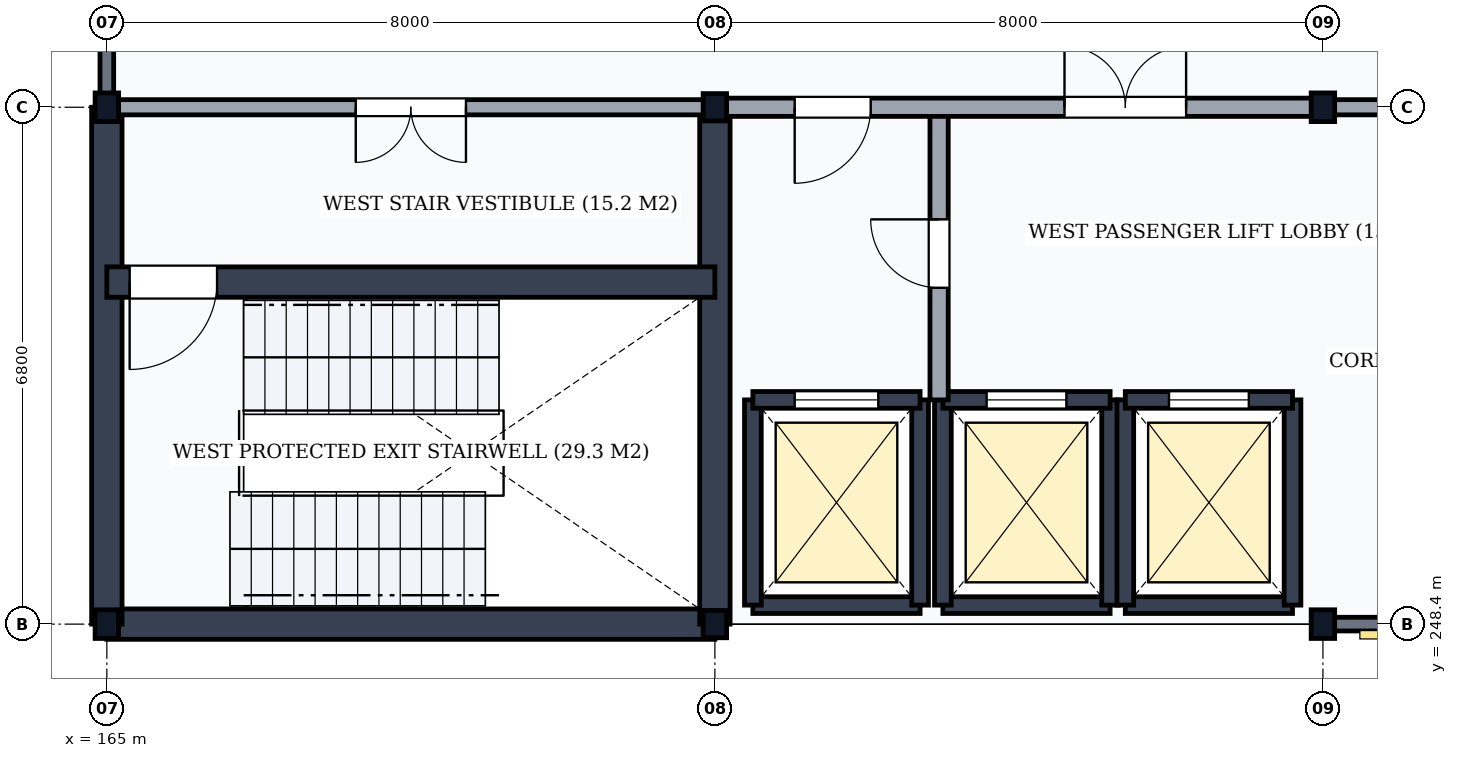
"""IFC4 building model, lengths in metres.
Left out: names, types, materials, properties, quantities, classifications, styles, units other than length and angle.
Written with IfcOpenShell. Run it as: python <this file> out.ifc"""

import sys

from ifc_helpers import new_model, si_unit, direction, frame, frame_2d, origin, origin_2d, place, context, subcontext, project, spatial, rectangle, i_section, extrude, element, fill, save


model = new_model("IFC4")
c1 = context("Model", 3, precision=1e-05, world=origin(), true_north=direction((0.0, 1.0)))
c2 = subcontext(c1, "Body", "Model", "MODEL_VIEW")
j1 = project(units=[si_unit("LENGTHUNIT", "METRE"), si_unit("PLANEANGLEUNIT", "RADIAN")], contexts=[c1])
p1 = place(None, origin())
s1 = spatial("IfcSite", under=j1, at=p1, CompositionType="ELEMENT")
p2 = place(p1, origin())
s2 = spatial("IfcBuilding", under=s1, at=p2, CompositionType="ELEMENT")
p3 = place(p2, frame((0.0, 0.0, 51.6)))
s3 = spatial("IfcBuildingStorey", under=s2, at=p3, CompositionType="ELEMENT", Elevation=51.6)
for number, where, z_axis, x_axis in (
    (1, (165.0, 248.4, 0.0), (0.0, 0.0, 1.0), (1.0, 0.0, 0.0)),
    (2, (165.0, 255.2, 0.0), (0.0, 0.0, 1.0), (1.0, 0.0, 0.0)),
):
    element("IfcColumn", number, at=place(p3, frame(where, z_axis=z_axis, x_axis=x_axis)), inside=s3, PredefinedType="COLUMN", context=c2, shape_type="SweptSolid", body=[
        extrude(i_section(OverallWidth=0.309, OverallDepth=0.377, WebThickness=0.021, FlangeThickness=0.04, FilletRadius=0.027, at=origin_2d()), origin(), (0.0, 0.0, 1.0), 4.5),
    ])
for number, where, z_axis, x_axis in (
    (3, (173.0, 248.4, 0.0), (0.0, 0.0, 1.0), (1.0, 0.0, 0.0)),
    (4, (173.0, 255.2, 0.0), (0.0, 0.0, 1.0), (1.0, 0.0, 0.0)),
):
    element("IfcColumn", number, at=place(p3, frame(where, z_axis=z_axis, x_axis=x_axis)), inside=s3, PredefinedType="COLUMN", context=c2, shape_type="SweptSolid", body=[
        extrude(i_section(OverallWidth=0.309, OverallDepth=0.359, WebThickness=0.021, FlangeThickness=0.04, FilletRadius=0.027, at=origin_2d()), origin(), (0.0, 0.0, 1.0), 4.5),
    ])
for number, where, z_axis, x_axis in (
    (5, (181.0, 248.4, 0.0), (0.0, 0.0, 1.0), (1.0, 0.0, 0.0)),
    (6, (181.0, 255.2, 0.0), (0.0, 0.0, 1.0), (1.0, 0.0, 0.0)),
):
    element("IfcColumn", number, at=place(p3, frame(where, z_axis=z_axis, x_axis=x_axis)), inside=s3, PredefinedType="COLUMN", context=c2, shape_type="SweptSolid", body=[
        extrude(i_section(OverallWidth=0.309, OverallDepth=0.377, WebThickness=0.021, FlangeThickness=0.04, FilletRadius=0.027, at=origin_2d()), origin(), (0.0, 0.0, 1.0), 4.5),
    ])
p4 = place(p3, frame((181.006, 248.4, 0.0), z_axis=(0.0, 0.0, 1.0), x_axis=(1.0, 0.0, 0.0)))
e7 = element("IfcWall", 7, at=p4, inside=s3, PredefinedType="SOLIDWALL", context=c2, shape_type="SweptSolid", body=[
    extrude(rectangle(XDim=7.988, YDim=0.18, at=frame_2d((3.994, 0.0))), origin(), (0.0, 0.0, 1.0), 3.868),
])
p5 = place(p4, frame((2.944, 0.0, 0.95)))
e8 = element("IfcOpeningElement", 8, at=p5, cuts=e7, PredefinedType="OPENING", context=c2, shape_type="SweptSolid", body=[
    extrude(rectangle(XDim=1.5, YDim=1.9, at=frame_2d((0.75, 0.95))), frame((0.0, 0.105, 0.0), z_axis=(0.0, -1.0, 0.0), x_axis=(1.0, 0.0, 0.0)), (0.0, 0.0, 1.0), 0.21),
])
p6 = place(p3, frame((165.0, 255.206, 0.0), z_axis=(0.0, 0.0, 1.0), x_axis=(0.0, 1.0, 0.0)))
e9 = element("IfcWall", 9, at=p6, inside=s3, PredefinedType="SOLIDWALL", context=c2, shape_type="SweptSolid", body=[
    extrude(rectangle(XDim=7.588, YDim=0.18, at=frame_2d((3.794, 0.0))), origin(), (0.0, 0.0, 1.0), 3.908),
])
p7 = place(p3, frame((165.0, 248.4, 0.0), z_axis=(0.0, 0.0, 1.0), x_axis=(1.0, 0.0, 0.0)))
e10 = element("IfcWall", 10, at=p7, inside=s3, PredefinedType="SHEAR", context=c2, shape_type="SweptSolid", body=[
    extrude(rectangle(XDim=8.0, YDim=0.4, at=frame_2d((4.0, 0.0))), origin(), (0.0, 0.0, 1.0), 4.18),
])
for number, where, z_axis, x_axis in (
    (11, (165.0, 248.4, 0.0), (0.0, 0.0, 1.0), (0.0, 1.0, 0.0)),
    (12, (173.0, 248.4, 0.0), (0.0, 0.0, 1.0), (0.0, 1.0, 0.0)),
):
    element("IfcWall", number, at=place(p3, frame(where, z_axis=z_axis, x_axis=x_axis)), inside=s3, PredefinedType="SHEAR", context=c2, shape_type="SweptSolid", body=[
        extrude(rectangle(XDim=6.8, YDim=0.4, at=frame_2d((3.4, 0.0))), origin(), (0.0, 0.0, 1.0), 4.18),
    ])
p8 = place(p3, frame((165.0, 252.9, 0.0), z_axis=(0.0, 0.0, 1.0), x_axis=(1.0, 0.0, 0.0)))
e13 = element("IfcWall", 13, at=p8, inside=s3, PredefinedType="SHEAR", context=c2, shape_type="SweptSolid", body=[
    extrude(rectangle(XDim=8.0, YDim=0.4, at=frame_2d((4.0, 0.0))), origin(), (0.0, 0.0, 1.0), 4.18),
])
p9 = place(p8, frame((0.3, 0.0, 0.0)))
e14 = element("IfcOpeningElement", 14, at=p9, cuts=e13, PredefinedType="OPENING", context=c2, shape_type="SweptSolid", body=[
    extrude(rectangle(XDim=1.15, YDim=2.15, at=frame_2d((0.575, 1.075))), frame((0.0, 0.215, 0.0), z_axis=(0.0, -1.0, 0.0), x_axis=(1.0, 0.0, 0.0)), (0.0, 0.0, 1.0), 0.43),
])
p10 = place(p3, frame((165.0, 255.2, 0.0), z_axis=(0.0, 0.0, 1.0), x_axis=(1.0, 0.0, 0.0)))
e15 = element("IfcWall", 15, at=p10, inside=s3, PredefinedType="PARTITIONING", context=c2, shape_type="SweptSolid", body=[
    extrude(rectangle(XDim=8.0, YDim=0.2, at=frame_2d((4.0, 0.0))), origin(), (0.0, 0.0, 1.0), 3.678),
])
p11 = place(p10, frame((3.275, 0.0, 0.0)))
e16 = element("IfcOpeningElement", 16, at=p11, cuts=e15, PredefinedType="OPENING", context=c2, shape_type="SweptSolid", body=[
    extrude(rectangle(XDim=1.45, YDim=2.2, at=frame_2d((0.725, 1.1))), frame((0.0, 0.115, 0.0), z_axis=(0.0, -1.0, 0.0), x_axis=(1.0, 0.0, 0.0)), (0.0, 0.0, 1.0), 0.23),
])
p12 = place(p3, frame((173.5, 248.65, 0.0), z_axis=(0.0, 0.0, 1.0), x_axis=(1.0, 0.0, 0.0)))
e17 = element("IfcWall", 17, at=p12, inside=s3, PredefinedType="SHEAR", context=c2, shape_type="SweptSolid", body=[
    extrude(rectangle(XDim=2.2, YDim=0.22, at=frame_2d((1.1, 0.0))), origin(), (0.0, 0.0, 1.0), 4.18),
])
for number, where, z_axis, x_axis in (
    (18, (173.5, 248.65, 0.0), (0.0, 0.0, 1.0), (0.0, 1.0, 0.0)),
    (19, (175.7, 248.65, 0.0), (0.0, 0.0, 1.0), (0.0, 1.0, 0.0)),
):
    element("IfcWall", number, at=place(p3, frame(where, z_axis=z_axis, x_axis=x_axis)), inside=s3, PredefinedType="SHEAR", context=c2, shape_type="SweptSolid", body=[
        extrude(rectangle(XDim=2.7, YDim=0.22, at=frame_2d((1.35, 0.0))), origin(), (0.0, 0.0, 1.0), 4.18),
    ])
p13 = place(p3, frame((173.5, 251.35, 0.0), z_axis=(0.0, 0.0, 1.0), x_axis=(1.0, 0.0, 0.0)))
e20 = element("IfcWall", 20, at=p13, inside=s3, PredefinedType="SHEAR", context=c2, shape_type="SweptSolid", body=[
    extrude(rectangle(XDim=2.2, YDim=0.22, at=frame_2d((1.1, 0.0))), origin(), (0.0, 0.0, 1.0), 4.18),
])
p14 = place(p13, frame((0.55, 0.0, 0.0)))
e21 = element("IfcOpeningElement", 21, at=p14, cuts=e20, PredefinedType="OPENING", context=c2, shape_type="SweptSolid", body=[
    extrude(rectangle(XDim=1.1, YDim=2.15, at=frame_2d((0.55, 1.075))), frame((0.0, 0.125, 0.0), z_axis=(0.0, -1.0, 0.0), x_axis=(1.0, 0.0, 0.0)), (0.0, 0.0, 1.0), 0.25),
])
p15 = place(p3, frame((176.0, 248.65, 0.0), z_axis=(0.0, 0.0, 1.0), x_axis=(1.0, 0.0, 0.0)))
e22 = element("IfcWall", 22, at=p15, inside=s3, PredefinedType="SHEAR", context=c2, shape_type="SweptSolid", body=[
    extrude(rectangle(XDim=2.2, YDim=0.22, at=frame_2d((1.1, 0.0))), origin(), (0.0, 0.0, 1.0), 4.18),
])
for number, where, z_axis, x_axis in (
    (23, (176.0, 248.65, 0.0), (0.0, 0.0, 1.0), (0.0, 1.0, 0.0)),
    (24, (178.2, 248.65, 0.0), (0.0, 0.0, 1.0), (0.0, 1.0, 0.0)),
):
    element("IfcWall", number, at=place(p3, frame(where, z_axis=z_axis, x_axis=x_axis)), inside=s3, PredefinedType="SHEAR", context=c2, shape_type="SweptSolid", body=[
        extrude(rectangle(XDim=2.7, YDim=0.22, at=frame_2d((1.35, 0.0))), origin(), (0.0, 0.0, 1.0), 4.18),
    ])
p16 = place(p3, frame((176.0, 251.35, 0.0), z_axis=(0.0, 0.0, 1.0), x_axis=(1.0, 0.0, 0.0)))
e25 = element("IfcWall", 25, at=p16, inside=s3, PredefinedType="SHEAR", context=c2, shape_type="SweptSolid", body=[
    extrude(rectangle(XDim=2.2, YDim=0.22, at=frame_2d((1.1, 0.0))), origin(), (0.0, 0.0, 1.0), 4.18),
])
p17 = place(p16, frame((0.575, 0.0, 0.0)))
e26 = element("IfcOpeningElement", 26, at=p17, cuts=e25, PredefinedType="OPENING", context=c2, shape_type="SweptSolid", body=[
    extrude(rectangle(XDim=1.05, YDim=2.15, at=frame_2d((0.525, 1.075))), frame((0.0, 0.125, 0.0), z_axis=(0.0, -1.0, 0.0), x_axis=(1.0, 0.0, 0.0)), (0.0, 0.0, 1.0), 0.25),
])
p18 = place(p3, frame((178.4, 248.65, 0.0), z_axis=(0.0, 0.0, 1.0), x_axis=(1.0, 0.0, 0.0)))
e27 = element("IfcWall", 27, at=p18, inside=s3, PredefinedType="SHEAR", context=c2, shape_type="SweptSolid", body=[
    extrude(rectangle(XDim=2.2, YDim=0.22, at=frame_2d((1.1, 0.0))), origin(), (0.0, 0.0, 1.0), 4.18),
])
for number, where, z_axis, x_axis in (
    (28, (178.4, 248.65, 0.0), (0.0, 0.0, 1.0), (0.0, 1.0, 0.0)),
    (29, (180.6, 248.65, 0.0), (0.0, 0.0, 1.0), (0.0, 1.0, 0.0)),
):
    element("IfcWall", number, at=place(p3, frame(where, z_axis=z_axis, x_axis=x_axis)), inside=s3, PredefinedType="SHEAR", context=c2, shape_type="SweptSolid", body=[
        extrude(rectangle(XDim=2.7, YDim=0.22, at=frame_2d((1.35, 0.0))), origin(), (0.0, 0.0, 1.0), 4.18),
    ])
p19 = place(p3, frame((178.4, 251.35, 0.0), z_axis=(0.0, 0.0, 1.0), x_axis=(1.0, 0.0, 0.0)))
e30 = element("IfcWall", 30, at=p19, inside=s3, PredefinedType="SHEAR", context=c2, shape_type="SweptSolid", body=[
    extrude(rectangle(XDim=2.2, YDim=0.22, at=frame_2d((1.1, 0.0))), origin(), (0.0, 0.0, 1.0), 4.18),
])
p20 = place(p19, frame((0.575, 0.0, 0.0)))
e31 = element("IfcOpeningElement", 31, at=p20, cuts=e30, PredefinedType="OPENING", context=c2, shape_type="SweptSolid", body=[
    extrude(rectangle(XDim=1.05, YDim=2.15, at=frame_2d((0.525, 1.075))), frame((0.0, 0.125, 0.0), z_axis=(0.0, -1.0, 0.0), x_axis=(1.0, 0.0, 0.0)), (0.0, 0.0, 1.0), 0.25),
])
p21 = place(p3, frame((175.95, 251.35, 0.0), z_axis=(0.0, 0.0, 1.0), x_axis=(0.0, 1.0, 0.0)))
e32 = element("IfcWall", 32, at=p21, inside=s3, PredefinedType="PARTITIONING", context=c2, shape_type="SweptSolid", body=[
    extrude(rectangle(XDim=3.85, YDim=0.24, at=frame_2d((1.925, 0.0))), origin(), (0.0, 0.0, 1.0), 4.18),
])
p22 = place(p21, frame((1.475, 0.0, 0.0)))
e33 = element("IfcOpeningElement", 33, at=p22, cuts=e32, PredefinedType="OPENING", context=c2, shape_type="SweptSolid", body=[
    extrude(rectangle(XDim=0.9, YDim=2.1, at=frame_2d((0.45, 1.05))), frame((0.0, 0.135, 0.0), z_axis=(0.0, -1.0, 0.0), x_axis=(1.0, 0.0, 0.0)), (0.0, 0.0, 1.0), 0.27),
])
p23 = place(p3, frame((173.0, 255.2, 0.0), z_axis=(0.0, 0.0, 1.0), x_axis=(1.0, 0.0, 0.0)))
e34 = element("IfcWall", 34, at=p23, inside=s3, PredefinedType="PARTITIONING", context=c2, shape_type="SweptSolid", body=[
    extrude(rectangle(XDim=8.0, YDim=0.24, at=frame_2d((4.0, 0.0))), origin(), (0.0, 0.0, 1.0), 3.678),
])
p24 = place(p23, frame((1.05, 0.0, 0.0)))
e35 = element("IfcOpeningElement", 35, at=p24, cuts=e34, PredefinedType="OPENING", context=c2, shape_type="SweptSolid", body=[
    extrude(rectangle(XDim=1.0, YDim=2.1, at=frame_2d((0.5, 1.05))), frame((0.0, 0.135, 0.0), z_axis=(0.0, -1.0, 0.0), x_axis=(1.0, 0.0, 0.0)), (0.0, 0.0, 1.0), 0.27),
])
p25 = place(p23, frame((4.6, 0.0, 0.0)))
e36 = element("IfcOpeningElement", 36, at=p25, cuts=e34, PredefinedType="OPENING", context=c2, shape_type="SweptSolid", body=[
    extrude(rectangle(XDim=1.6, YDim=2.25, at=frame_2d((0.8, 1.125))), frame((0.0, 0.135, 0.0), z_axis=(0.0, -1.0, 0.0), x_axis=(1.0, 0.0, 0.0)), (0.0, 0.0, 1.0), 0.27),
])
p26 = place(p3, frame((181.0, 255.2, 0.0), z_axis=(0.0, 0.0, 1.0), x_axis=(1.0, 0.0, 0.0)))
e37 = element("IfcWall", 37, at=p26, inside=s3, PredefinedType="PARTITIONING", context=c2, shape_type="SweptSolid", body=[
    extrude(rectangle(XDim=8.0, YDim=0.2, at=frame_2d((4.0, 0.0))), origin(), (0.0, 0.0, 1.0), 3.678),
])
p27 = place(p26, frame((0.85, 0.0, 0.0)))
e38 = element("IfcOpeningElement", 38, at=p27, cuts=e37, PredefinedType="OPENING", context=c2, shape_type="SweptSolid", body=[
    extrude(rectangle(XDim=0.9, YDim=2.1, at=frame_2d((0.45, 1.05))), frame((0.0, 0.115, 0.0), z_axis=(0.0, -1.0, 0.0), x_axis=(1.0, 0.0, 0.0)), (0.0, 0.0, 1.0), 0.23),
])
p28 = place(p26, frame((3.25, 0.0, 0.0)))
e39 = element("IfcOpeningElement", 39, at=p28, cuts=e37, PredefinedType="OPENING", context=c2, shape_type="SweptSolid", body=[
    extrude(rectangle(XDim=0.9, YDim=2.1, at=frame_2d((0.45, 1.05))), frame((0.0, 0.115, 0.0), z_axis=(0.0, -1.0, 0.0), x_axis=(1.0, 0.0, 0.0)), (0.0, 0.0, 1.0), 0.23),
])
p29 = place(p26, frame((5.075, 0.0, 0.0)))
e40 = element("IfcOpeningElement", 40, at=p29, cuts=e37, PredefinedType="OPENING", context=c2, shape_type="SweptSolid", body=[
    extrude(rectangle(XDim=0.95, YDim=2.1, at=frame_2d((0.475, 1.05))), frame((0.0, 0.115, 0.0), z_axis=(0.0, -1.0, 0.0), x_axis=(1.0, 0.0, 0.0)), (0.0, 0.0, 1.0), 0.23),
])
p30 = place(p26, frame((6.5, 0.0, 0.0)))
e41 = element("IfcOpeningElement", 41, at=p30, cuts=e37, PredefinedType="OPENING", context=c2, shape_type="SweptSolid", body=[
    extrude(rectangle(XDim=0.85, YDim=2.1, at=frame_2d((0.425, 1.05))), frame((0.0, 0.115, 0.0), z_axis=(0.0, -1.0, 0.0), x_axis=(1.0, 0.0, 0.0)), (0.0, 0.0, 1.0), 0.23),
])
p31 = place(p9, frame((1.15, 0.0, 0.0), z_axis=(0.0, 0.0, 1.0), x_axis=(-1.0, 0.0, 0.0)))
e42 = element("IfcDoor", 42, at=p31, inside=s3, OperationType="SINGLE_SWING_RIGHT", PredefinedType="DOOR", context=c2, shape_type="SweptSolid", body=[
    extrude(rectangle(XDim=1.15, YDim=2.15, at=frame_2d((0.575, 1.075))), frame((0.0, 0.025, 0.0), z_axis=(0.0, -1.0, 0.0), x_axis=(1.0, 0.0, 0.0)), (0.0, 0.0, 1.0), 0.05),
])
fill(e14, e42)
p32 = place(p11, frame((1.45, 0.0, 0.0), z_axis=(0.0, 0.0, 1.0), x_axis=(-1.0, 0.0, 0.0)))
e43 = element("IfcDoor", 43, at=p32, inside=s3, OperationType="DOUBLE_DOOR_SINGLE_SWING", PredefinedType="DOOR", context=c2, shape_type="SweptSolid", body=[
    extrude(rectangle(XDim=1.45, YDim=2.2, at=frame_2d((0.725, 1.1))), frame((0.0, 0.025, 0.0), z_axis=(0.0, -1.0, 0.0), x_axis=(1.0, 0.0, 0.0)), (0.0, 0.0, 1.0), 0.05),
])
fill(e16, e43)
p33 = place(p14, origin())
e44 = element("IfcDoor", 44, at=p33, inside=s3, OperationType="DOUBLE_DOOR_SLIDING", PredefinedType="USERDEFINED", context=c2, shape_type="SweptSolid", body=[
    extrude(rectangle(XDim=1.1, YDim=2.15, at=frame_2d((0.55, 1.075))), frame((0.0, 0.025, 0.0), z_axis=(0.0, -1.0, 0.0), x_axis=(1.0, 0.0, 0.0)), (0.0, 0.0, 1.0), 0.05),
])
fill(e21, e44)
p34 = place(p17, origin())
e45 = element("IfcDoor", 45, at=p34, inside=s3, OperationType="DOUBLE_DOOR_SLIDING", PredefinedType="USERDEFINED", context=c2, shape_type="SweptSolid", body=[
    extrude(rectangle(XDim=1.05, YDim=2.15, at=frame_2d((0.525, 1.075))), frame((0.0, 0.025, 0.0), z_axis=(0.0, -1.0, 0.0), x_axis=(1.0, 0.0, 0.0)), (0.0, 0.0, 1.0), 0.05),
])
fill(e26, e45)
p35 = place(p20, origin())
e46 = element("IfcDoor", 46, at=p35, inside=s3, OperationType="DOUBLE_DOOR_SLIDING", PredefinedType="USERDEFINED", context=c2, shape_type="SweptSolid", body=[
    extrude(rectangle(XDim=1.05, YDim=2.15, at=frame_2d((0.525, 1.075))), frame((0.0, 0.025, 0.0), z_axis=(0.0, -1.0, 0.0), x_axis=(1.0, 0.0, 0.0)), (0.0, 0.0, 1.0), 0.05),
])
fill(e31, e46)
p36 = place(p22, frame((0.9, 0.0, 0.0), z_axis=(0.0, 0.0, 1.0), x_axis=(-1.0, 0.0, 0.0)))
e47 = element("IfcDoor", 47, at=p36, inside=s3, OperationType="SINGLE_SWING_LEFT", PredefinedType="DOOR", context=c2, shape_type="SweptSolid", body=[
    extrude(rectangle(XDim=0.9, YDim=2.1, at=frame_2d((0.45, 1.05))), frame((0.0, 0.025, 0.0), z_axis=(0.0, -1.0, 0.0), x_axis=(1.0, 0.0, 0.0)), (0.0, 0.0, 1.0), 0.05),
])
fill(e33, e47)
p37 = place(p24, frame((1.0, 0.0, 0.0), z_axis=(0.0, 0.0, 1.0), x_axis=(-1.0, 0.0, 0.0)))
e48 = element("IfcDoor", 48, at=p37, inside=s3, OperationType="SINGLE_SWING_RIGHT", PredefinedType="DOOR", context=c2, shape_type="SweptSolid", body=[
    extrude(rectangle(XDim=1.0, YDim=2.1, at=frame_2d((0.5, 1.05))), frame((0.0, 0.025, 0.0), z_axis=(0.0, -1.0, 0.0), x_axis=(1.0, 0.0, 0.0)), (0.0, 0.0, 1.0), 0.05),
])
fill(e35, e48)
p38 = place(p25, origin())
e49 = element("IfcDoor", 49, at=p38, inside=s3, OperationType="DOUBLE_DOOR_SINGLE_SWING", PredefinedType="DOOR", context=c2, shape_type="SweptSolid", body=[
    extrude(rectangle(XDim=1.6, YDim=2.25, at=frame_2d((0.8, 1.125))), frame((0.0, 0.025, 0.0), z_axis=(0.0, -1.0, 0.0), x_axis=(1.0, 0.0, 0.0)), (0.0, 0.0, 1.0), 0.05),
])
fill(e36, e49)
save(model, sys.argv[1])
